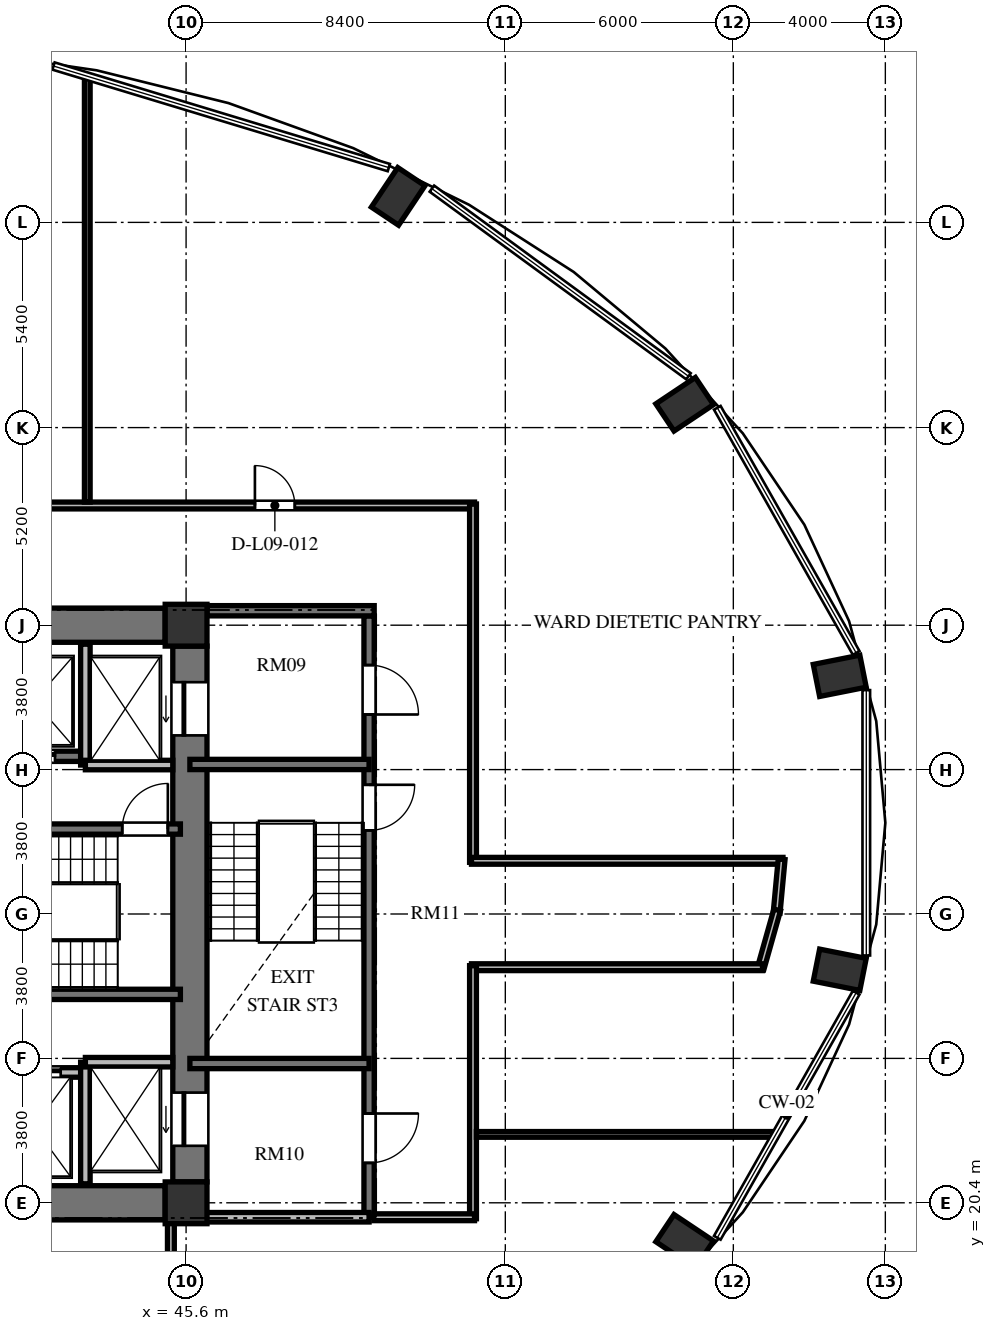
"""IFC4 building model, lengths in metres.
Left out: names, types, materials, properties, quantities, classifications, styles, units other than length and angle.
Written with IfcOpenShell. Run it as: python <this file> out.ifc"""

import sys

from ifc_helpers import new_model, si_unit, direction, frame, frame_2d, origin, origin_2d, place, context, subcontext, project, spatial, rectangle, extrude, element, fill, save


model = new_model("IFC4")
c1 = context("Model", 3, precision=1e-05, world=origin(), true_north=direction((0.0, 1.0)))
c2 = subcontext(c1, "Body", "Model", "MODEL_VIEW")
j1 = project(units=[si_unit("LENGTHUNIT", "METRE"), si_unit("PLANEANGLEUNIT", "RADIAN")], contexts=[c1])
p1 = place(None, origin())
s1 = spatial("IfcSite", under=j1, at=p1, CompositionType="ELEMENT")
p2 = place(p1, origin())
s2 = spatial("IfcBuilding", under=s1, at=p2, CompositionType="ELEMENT")
p3 = place(p2, frame((0.0, 0.0, 39.792)))
s3 = spatial("IfcBuildingStorey", under=s2, at=p3, CompositionType="ELEMENT", Elevation=39.792)
for number, where, z_axis, x_axis in (
    (1, (58.72, 19.386, 0.0), (0.0, 0.0, 1.0), (0.831, -0.556, 0.0)),
    (2, (62.8, 26.532, 0.0), (0.0, 0.0, 1.0), (0.981, -0.195, 0.0)),
    (3, (62.8, 34.268, 0.0), (0.0, 0.0, 1.0), (0.981, 0.195, 0.0)),
    (4, (58.72, 41.414, 0.0), (0.0, 0.0, 1.0), (0.831, 0.556, 0.0)),
    (5, (51.181, 46.884, 0.0), (0.0, 0.0, 1.0), (0.556, 0.831, 0.0)),
):
    element("IfcColumn", number, at=place(p3, frame(where, z_axis=z_axis, x_axis=x_axis)), inside=s3, PredefinedType="COLUMN", context=c2, shape_type="SweptSolid", body=[
        extrude(rectangle(XDim=1.25, YDim=0.86, at=origin_2d()), origin(), (0.0, 0.0, 1.0), 3.648),
    ])
for number, where, z_axis, x_axis in (
    (6, (45.6, 20.4, 0.0), (0.0, 0.0, 1.0), (1.0, 0.0, 0.0)),
    (7, (45.6, 35.6, 0.0), (0.0, 0.0, 1.0), (1.0, 0.0, 0.0)),
):
    element("IfcColumn", number, at=place(p3, frame(where, z_axis=z_axis, x_axis=x_axis)), inside=s3, PredefinedType="COLUMN", context=c2, shape_type="SweptSolid", body=[
        extrude(rectangle(XDim=1.1, YDim=1.1, at=origin_2d()), origin(), (0.0, 0.0, 1.0), 3.648),
    ])
p4 = place(p3, frame((45.7, 20.95, 0.0), z_axis=(0.0, 0.0, 1.0), x_axis=(0.0, 1.0, 0.0)))
e8 = element("IfcWall", 8, at=p4, inside=s3, PredefinedType="SHEAR", context=c2, shape_type="SweptSolid", body=[
    extrude(rectangle(XDim=14.1, YDim=0.9, at=frame_2d((7.05, 0.0))), origin(), (0.0, 0.0, 1.0), 3.648),
])
p5 = place(p4, frame((11.75, 0.0, 0.0)))
e9 = element("IfcOpeningElement", 9, at=p5, cuts=e8, PredefinedType="OPENING", context=c2, shape_type="SweptSolid", body=[
    extrude(rectangle(XDim=1.4, YDim=2.3, at=frame_2d((0.7, 1.15))), frame((0.0, 0.46, 0.0), z_axis=(0.0, -1.0, 0.0), x_axis=(1.0, 0.0, 0.0)), (0.0, 0.0, 1.0), 0.92),
])
p6 = place(p4, frame((0.95, 0.0, 0.0)))
e10 = element("IfcOpeningElement", 10, at=p6, cuts=e8, PredefinedType="OPENING", context=c2, shape_type="SweptSolid", body=[
    extrude(rectangle(XDim=1.4, YDim=2.3, at=frame_2d((0.7, 1.15))), frame((0.0, 0.46, 0.0), z_axis=(0.0, -1.0, 0.0), x_axis=(1.0, 0.0, 0.0)), (0.0, 0.0, 1.0), 0.92),
])
for number, where, z_axis, x_axis in (
    (11, (39.75, 20.4, 0.0), (0.0, 0.0, 1.0), (1.0, 0.0, 0.0)),
    (12, (39.75, 35.6, 0.0), (0.0, 0.0, 1.0), (1.0, 0.0, 0.0)),
):
    element("IfcWall", number, at=place(p3, frame(where, z_axis=z_axis, x_axis=x_axis)), inside=s3, PredefinedType="SHEAR", context=c2, shape_type="SweptSolid", body=[
        extrude(rectangle(XDim=5.3, YDim=0.9, at=frame_2d((2.65, 0.0))), origin(), (0.0, 0.0, 1.0), 3.648),
    ])
p7 = place(p3, frame((37.465, 30.235, 0.0), z_axis=(0.0, 0.0, 1.0), x_axis=(1.0, 0.0, 0.0)))
e13 = element("IfcWall", 13, at=p7, inside=s3, PredefinedType="SHEAR", context=c2, shape_type="SweptSolid", body=[
    extrude(rectangle(XDim=7.985, YDim=0.27, at=frame_2d((3.992, 0.0))), origin(), (0.0, 0.0, 1.0), 3.648),
])
p8 = place(p7, frame((6.455, 0.0, 0.0)))
e14 = element("IfcOpeningElement", 14, at=p8, cuts=e13, PredefinedType="OPENING", context=c2, shape_type="SweptSolid", body=[
    extrude(rectangle(XDim=1.2, YDim=2.15, at=frame_2d((0.6, 1.075))), frame((0.0, 0.145, 0.0), z_axis=(0.0, -1.0, 0.0), x_axis=(1.0, 0.0, 0.0)), (0.0, 0.0, 1.0), 0.29),
])
p9 = place(p3, frame((37.465, 25.885, 0.0), z_axis=(0.0, 0.0, 1.0), x_axis=(1.0, 0.0, 0.0)))
e15 = element("IfcWall", 15, at=p9, inside=s3, PredefinedType="SHEAR", context=c2, shape_type="SweptSolid", body=[
    extrude(rectangle(XDim=7.985, YDim=0.27, at=frame_2d((3.992, 0.0))), origin(), (0.0, 0.0, 1.0), 3.648),
])
p10 = place(p3, frame((26.55, 32.15, 0.0), z_axis=(0.0, 0.0, 1.0), x_axis=(1.0, 0.0, 0.0)))
e16 = element("IfcWall", 16, at=p10, inside=s3, PredefinedType="SHEAR", context=c2, shape_type="SweptSolid", body=[
    extrude(rectangle(XDim=16.4, YDim=0.27, at=frame_2d((8.2, 0.0))), origin(), (0.0, 0.0, 1.0), 3.648),
])
p11 = place(p10, frame((1.1, 0.0, 0.0)))
e17 = element("IfcOpeningElement", 17, at=p11, cuts=e16, PredefinedType="OPENING", context=c2, shape_type="SweptSolid", body=[
    extrude(rectangle(XDim=1.1, YDim=2.2, at=frame_2d((0.55, 1.1))), frame((0.0, 0.145, 0.0), z_axis=(0.0, -1.0, 0.0), x_axis=(1.0, 0.0, 0.0)), (0.0, 0.0, 1.0), 0.29),
])
p12 = place(p10, frame((3.7, 0.0, 0.0)))
e18 = element("IfcOpeningElement", 18, at=p12, cuts=e16, PredefinedType="OPENING", context=c2, shape_type="SweptSolid", body=[
    extrude(rectangle(XDim=1.1, YDim=2.2, at=frame_2d((0.55, 1.1))), frame((0.0, 0.145, 0.0), z_axis=(0.0, -1.0, 0.0), x_axis=(1.0, 0.0, 0.0)), (0.0, 0.0, 1.0), 0.29),
])
p13 = place(p10, frame((6.5, 0.0, 0.0)))
e19 = element("IfcOpeningElement", 19, at=p13, cuts=e16, PredefinedType="OPENING", context=c2, shape_type="SweptSolid", body=[
    extrude(rectangle(XDim=1.1, YDim=2.2, at=frame_2d((0.55, 1.1))), frame((0.0, 0.145, 0.0), z_axis=(0.0, -1.0, 0.0), x_axis=(1.0, 0.0, 0.0)), (0.0, 0.0, 1.0), 0.29),
])
p14 = place(p10, frame((9.1, 0.0, 0.0)))
e20 = element("IfcOpeningElement", 20, at=p14, cuts=e16, PredefinedType="OPENING", context=c2, shape_type="SweptSolid", body=[
    extrude(rectangle(XDim=1.1, YDim=2.2, at=frame_2d((0.55, 1.1))), frame((0.0, 0.145, 0.0), z_axis=(0.0, -1.0, 0.0), x_axis=(1.0, 0.0, 0.0)), (0.0, 0.0, 1.0), 0.29),
])
p15 = place(p10, frame((11.9, 0.0, 0.0)))
e21 = element("IfcOpeningElement", 21, at=p15, cuts=e16, PredefinedType="OPENING", context=c2, shape_type="SweptSolid", body=[
    extrude(rectangle(XDim=1.1, YDim=2.2, at=frame_2d((0.55, 1.1))), frame((0.0, 0.145, 0.0), z_axis=(0.0, -1.0, 0.0), x_axis=(1.0, 0.0, 0.0)), (0.0, 0.0, 1.0), 0.29),
])
p16 = place(p10, frame((14.5, 0.0, 0.0)))
e22 = element("IfcOpeningElement", 22, at=p16, cuts=e16, PredefinedType="OPENING", context=c2, shape_type="SweptSolid", body=[
    extrude(rectangle(XDim=1.1, YDim=2.2, at=frame_2d((0.55, 1.1))), frame((0.0, 0.145, 0.0), z_axis=(0.0, -1.0, 0.0), x_axis=(1.0, 0.0, 0.0)), (0.0, 0.0, 1.0), 0.29),
])
p17 = place(p3, frame((26.75, 23.83, 0.0), z_axis=(0.0, 0.0, 1.0), x_axis=(1.0, 0.0, 0.0)))
e23 = element("IfcWall", 23, at=p17, inside=s3, PredefinedType="SOLIDWALL", context=c2, shape_type="SweptSolid", body=[
    extrude(rectangle(XDim=16.2, YDim=0.25, at=frame_2d((8.1, 0.0))), origin(), (0.0, 0.0, 1.0), 3.428),
])
p18 = place(p17, frame((0.9, 0.0, 0.0)))
e24 = element("IfcOpeningElement", 24, at=p18, cuts=e23, PredefinedType="OPENING", context=c2, shape_type="SweptSolid", body=[
    extrude(rectangle(XDim=1.1, YDim=2.2, at=frame_2d((0.55, 1.1))), frame((0.0, 0.135, 0.0), z_axis=(0.0, -1.0, 0.0), x_axis=(1.0, 0.0, 0.0)), (0.0, 0.0, 1.0), 0.27),
])
p19 = place(p17, frame((3.5, 0.0, 0.0)))
e25 = element("IfcOpeningElement", 25, at=p19, cuts=e23, PredefinedType="OPENING", context=c2, shape_type="SweptSolid", body=[
    extrude(rectangle(XDim=1.1, YDim=2.2, at=frame_2d((0.55, 1.1))), frame((0.0, 0.135, 0.0), z_axis=(0.0, -1.0, 0.0), x_axis=(1.0, 0.0, 0.0)), (0.0, 0.0, 1.0), 0.27),
])
p20 = place(p17, frame((6.3, 0.0, 0.0)))
e26 = element("IfcOpeningElement", 26, at=p20, cuts=e23, PredefinedType="OPENING", context=c2, shape_type="SweptSolid", body=[
    extrude(rectangle(XDim=1.1, YDim=2.2, at=frame_2d((0.55, 1.1))), frame((0.0, 0.135, 0.0), z_axis=(0.0, -1.0, 0.0), x_axis=(1.0, 0.0, 0.0)), (0.0, 0.0, 1.0), 0.27),
])
p21 = place(p17, frame((8.9, 0.0, 0.0)))
e27 = element("IfcOpeningElement", 27, at=p21, cuts=e23, PredefinedType="OPENING", context=c2, shape_type="SweptSolid", body=[
    extrude(rectangle(XDim=1.1, YDim=2.2, at=frame_2d((0.55, 1.1))), frame((0.0, 0.135, 0.0), z_axis=(0.0, -1.0, 0.0), x_axis=(1.0, 0.0, 0.0)), (0.0, 0.0, 1.0), 0.27),
])
p22 = place(p17, frame((11.7, 0.0, 0.0)))
e28 = element("IfcOpeningElement", 28, at=p22, cuts=e23, PredefinedType="OPENING", context=c2, shape_type="SweptSolid", body=[
    extrude(rectangle(XDim=1.1, YDim=2.2, at=frame_2d((0.55, 1.1))), frame((0.0, 0.135, 0.0), z_axis=(0.0, -1.0, 0.0), x_axis=(1.0, 0.0, 0.0)), (0.0, 0.0, 1.0), 0.27),
])
p23 = place(p17, frame((14.15, 0.0, 0.0)))
e29 = element("IfcOpeningElement", 29, at=p23, cuts=e23, PredefinedType="OPENING", context=c2, shape_type="SweptSolid", body=[
    extrude(rectangle(XDim=1.4, YDim=2.3, at=frame_2d((0.7, 1.15))), frame((0.0, 0.135, 0.0), z_axis=(0.0, -1.0, 0.0), x_axis=(1.0, 0.0, 0.0)), (0.0, 0.0, 1.0), 0.27),
])
p24 = place(p3, frame((42.95, 31.92, 0.0), z_axis=(0.0, 0.0, 1.0), x_axis=(0.0, 1.0, 0.0)))
e30 = element("IfcWall", 30, at=p24, inside=s3, PredefinedType="SOLIDWALL", context=c2, shape_type="SweptSolid", body=[
    extrude(rectangle(XDim=3.18, YDim=0.25, at=frame_2d((1.59, 0.0))), origin(), (0.0, 0.0, 1.0), 3.428),
])
p25 = place(p3, frame((42.95, 31.92, 0.0), z_axis=(0.0, 0.0, 1.0), x_axis=(1.0, 0.0, 0.0)))
e31 = element("IfcWall", 31, at=p25, inside=s3, PredefinedType="SOLIDWALL", context=c2, shape_type="SweptSolid", body=[
    extrude(rectangle(XDim=2.3, YDim=0.25, at=frame_2d((1.15, 0.0))), origin(), (0.0, 0.0, 1.0), 3.428),
])
p26 = place(p3, frame((42.95, 20.9, 0.0), z_axis=(0.0, 0.0, 1.0), x_axis=(0.0, 1.0, 0.0)))
e32 = element("IfcWall", 32, at=p26, inside=s3, PredefinedType="SOLIDWALL", context=c2, shape_type="SweptSolid", body=[
    extrude(rectangle(XDim=3.2, YDim=0.25, at=frame_2d((1.6, 0.0))), origin(), (0.0, 0.0, 1.0), 3.428),
])
p27 = place(p3, frame((42.95, 24.1, 0.0), z_axis=(0.0, 0.0, 1.0), x_axis=(1.0, 0.0, 0.0)))
e33 = element("IfcWall", 33, at=p27, inside=s3, PredefinedType="SOLIDWALL", context=c2, shape_type="SweptSolid", body=[
    extrude(rectangle(XDim=2.3, YDim=0.25, at=frame_2d((1.15, 0.0))), origin(), (0.0, 0.0, 1.0), 3.428),
])
p28 = place(p3, frame((50.415, 35.845, 0.0), z_axis=(0.0, 0.0, 1.0), x_axis=(0.0, -1.0, 0.0)))
e34 = element("IfcWall", 34, at=p28, inside=s3, PredefinedType="SHEAR", context=c2, shape_type="SweptSolid", body=[
    extrude(rectangle(XDim=15.825, YDim=0.27, at=frame_2d((7.913, 0.0))), origin(), (0.0, 0.0, 1.0), 3.648),
])
p29 = place(p28, frame((4.445, 0.0, 0.0)))
e35 = element("IfcOpeningElement", 35, at=p29, cuts=e34, PredefinedType="OPENING", context=c2, shape_type="SweptSolid", body=[
    extrude(rectangle(XDim=1.2, YDim=2.15, at=frame_2d((0.6, 1.075))), frame((0.0, 0.145, 0.0), z_axis=(0.0, -1.0, 0.0), x_axis=(1.0, 0.0, 0.0)), (0.0, 0.0, 1.0), 0.29),
])
p30 = place(p28, frame((1.295, 0.0, 0.0)))
e36 = element("IfcOpeningElement", 36, at=p30, cuts=e34, PredefinedType="OPENING", context=c2, shape_type="SweptSolid", body=[
    extrude(rectangle(XDim=1.3, YDim=2.2, at=frame_2d((0.65, 1.1))), frame((0.0, 0.145, 0.0), z_axis=(0.0, -1.0, 0.0), x_axis=(1.0, 0.0, 0.0)), (0.0, 0.0, 1.0), 0.29),
])
p31 = place(p28, frame((13.095, 0.0, 0.0)))
e37 = element("IfcOpeningElement", 37, at=p31, cuts=e34, PredefinedType="OPENING", context=c2, shape_type="SweptSolid", body=[
    extrude(rectangle(XDim=1.3, YDim=2.2, at=frame_2d((0.65, 1.1))), frame((0.0, 0.145, 0.0), z_axis=(0.0, -1.0, 0.0), x_axis=(1.0, 0.0, 0.0)), (0.0, 0.0, 1.0), 0.29),
])
p32 = place(p3, frame((46.15, 35.98, 0.0), z_axis=(0.0, 0.0, 1.0), x_axis=(1.0, 0.0, 0.0)))
e38 = element("IfcWall", 38, at=p32, inside=s3, PredefinedType="SHEAR", context=c2, shape_type="SweptSolid", body=[
    extrude(rectangle(XDim=4.4, YDim=0.27, at=frame_2d((2.2, 0.0))), origin(), (0.0, 0.0, 1.0), 3.648),
])
for number, where, z_axis, x_axis in (
    (39, (45.7, 31.935, 0.0), (0.0, 0.0, 1.0), (1.0, 0.0, 0.0)),
    (40, (45.7, 24.065, 0.0), (0.0, 0.0, 1.0), (1.0, 0.0, 0.0)),
):
    element("IfcWall", number, at=place(p3, frame(where, z_axis=z_axis, x_axis=x_axis)), inside=s3, PredefinedType="SHEAR", context=c2, shape_type="SweptSolid", body=[
        extrude(rectangle(XDim=4.715, YDim=0.27, at=frame_2d((2.357, 0.0))), origin(), (0.0, 0.0, 1.0), 3.648),
    ])
p33 = place(p3, frame((45.7, 20.02, 0.0), z_axis=(0.0, 0.0, 1.0), x_axis=(1.0, 0.0, 0.0)))
e41 = element("IfcWall", 41, at=p33, inside=s3, PredefinedType="SOLIDWALL", context=c2, shape_type="SweptSolid", body=[
    extrude(rectangle(XDim=4.715, YDim=0.25, at=frame_2d((2.357, 0.0))), origin(), (0.0, 0.0, 1.0), 2.813),
])
p34 = place(p3, frame((23.31, 38.75, 0.0), z_axis=(0.0, 0.0, 1.0), x_axis=(1.0, 0.0, 0.0)))
e42 = element("IfcWall", 42, at=p34, inside=s3, PredefinedType="PARTITIONING", context=c2, shape_type="SweptSolid", body=[
    extrude(rectangle(XDim=29.88, YDim=0.18, at=frame_2d((14.94, 0.0))), origin(), (0.0, 0.0, 1.0), 3.053),
])
p35 = place(p34, frame((24.101, 0.0, 0.0)))
e43 = element("IfcOpeningElement", 43, at=p35, cuts=e42, PredefinedType="OPENING", context=c2, shape_type="SweptSolid", body=[
    extrude(rectangle(XDim=1.05, YDim=2.15, at=frame_2d((0.525, 1.075))), frame((0.0, 0.1, 0.0), z_axis=(0.0, -1.0, 0.0), x_axis=(1.0, 0.0, 0.0)), (0.0, 0.0, 1.0), 0.2),
])
p36 = place(p34, frame((13.165, 0.0, 0.0)))
e44 = element("IfcOpeningElement", 44, at=p36, cuts=e42, PredefinedType="OPENING", context=c2, shape_type="SweptSolid", body=[
    extrude(rectangle(XDim=1.05, YDim=2.15, at=frame_2d((0.525, 1.075))), frame((0.0, 0.1, 0.0), z_axis=(0.0, -1.0, 0.0), x_axis=(1.0, 0.0, 0.0)), (0.0, 0.0, 1.0), 0.2),
])
p37 = place(p34, frame((4.479, 0.0, 0.0)))
e45 = element("IfcOpeningElement", 45, at=p37, cuts=e42, PredefinedType="OPENING", context=c2, shape_type="SweptSolid", body=[
    extrude(rectangle(XDim=1.05, YDim=2.15, at=frame_2d((0.525, 1.075))), frame((0.0, 0.1, 0.0), z_axis=(0.0, -1.0, 0.0), x_axis=(1.0, 0.0, 0.0)), (0.0, 0.0, 1.0), 0.2),
])
p38 = place(p3, frame((53.15, 38.79, 0.0), z_axis=(0.0, 0.0, 1.0), x_axis=(0.0, -1.0, 0.0)))
e46 = element("IfcWall", 46, at=p38, inside=s3, PredefinedType="PARTITIONING", context=c2, shape_type="SweptSolid", body=[
    extrude(rectangle(XDim=9.43, YDim=0.18, at=frame_2d((4.715, 0.0))), origin(), (0.0, 0.0, 1.0), 3.428),
])
p39 = place(p3, frame((53.11, 29.4, 0.0), z_axis=(0.0, 0.0, 1.0), x_axis=(1.0, 0.0, 0.0)))
e47 = element("IfcWall", 47, at=p39, inside=s3, PredefinedType="PARTITIONING", context=c2, shape_type="SweptSolid", body=[
    extrude(rectangle(XDim=8.197, YDim=0.18, at=frame_2d((4.098, 0.0))), origin(), (0.0, 0.0, 1.0), 3.428),
])
p40 = place(p3, frame((61.271, 29.44, 0.0), z_axis=(0.0, 0.0, 1.0), x_axis=(-0.092539930621, -0.995708974169, 0.0)))
e48 = element("IfcWall", 48, at=p40, inside=s3, PredefinedType="PARTITIONING", context=c2, shape_type="SweptSolid", body=[
    extrude(rectangle(XDim=1.417, YDim=0.18, at=frame_2d((0.708, 0.0))), origin(), (0.0, 0.0, 1.0), 3.428),
])
p41 = place(p3, frame((61.154, 28.107, 0.0), z_axis=(0.0, 0.0, 1.0), x_axis=(-0.271748942561, -0.962368179138, 0.0)))
e49 = element("IfcWall", 49, at=p41, inside=s3, PredefinedType="PARTITIONING", context=c2, shape_type="SweptSolid", body=[
    extrude(rectangle(XDim=1.606, YDim=0.18, at=frame_2d((0.803, 0.0))), origin(), (0.0, 0.0, 1.0), 3.428),
])
p42 = place(p3, frame((60.768, 26.6, 0.0), z_axis=(0.0, 0.0, 1.0), x_axis=(-1.0, 0.0, 0.0)))
e50 = element("IfcWall", 50, at=p42, inside=s3, PredefinedType="PARTITIONING", context=c2, shape_type="SweptSolid", body=[
    extrude(rectangle(XDim=7.658, YDim=0.18, at=frame_2d((3.829, 0.0))), origin(), (0.0, 0.0, 1.0), 3.428),
])
p43 = place(p3, frame((53.15, 26.64, 0.0), z_axis=(0.0, 0.0, 1.0), x_axis=(0.0, -1.0, 0.0)))
e51 = element("IfcWall", 51, at=p43, inside=s3, PredefinedType="PARTITIONING", context=c2, shape_type="SweptSolid", body=[
    extrude(rectangle(XDim=6.66, YDim=0.18, at=frame_2d((3.33, 0.0))), origin(), (0.0, 0.0, 1.0), 3.428),
])
p44 = place(p3, frame((53.19, 20.02, 0.0), z_axis=(0.0, 0.0, 1.0), x_axis=(-1.0, 0.0, 0.0)))
e52 = element("IfcWall", 52, at=p44, inside=s3, PredefinedType="PARTITIONING", context=c2, shape_type="SweptSolid", body=[
    extrude(rectangle(XDim=2.65, YDim=0.18, at=frame_2d((1.325, 0.0))), origin(), (0.0, 0.0, 1.0), 2.813),
])
p45 = place(p3, frame((45.2, 19.91, 0.0), z_axis=(0.0, 0.0, 1.0), x_axis=(0.0, -1.0, 0.0)))
e53 = element("IfcWall", 53, at=p45, inside=s3, PredefinedType="PARTITIONING", context=c2, shape_type="SweptSolid", body=[
    extrude(rectangle(XDim=2.55, YDim=0.18, at=frame_2d((1.275, 0.0))), origin(), (0.0, 0.0, 1.0), 3.428),
])
p46 = place(p3, frame((53.24, 22.2, 0.0), z_axis=(0.0, 0.0, 1.0), x_axis=(1.0, 0.0, 0.0)))
e54 = element("IfcWall", 54, at=p46, inside=s3, PredefinedType="PARTITIONING", context=c2, shape_type="SweptSolid", body=[
    extrude(rectangle(XDim=7.875, YDim=0.15, at=frame_2d((3.938, 0.0))), origin(), (0.0, 0.0, 1.0), 3.428),
])
p47 = place(p3, frame((43.0, 38.84, 0.0), z_axis=(0.0, 0.0, 1.0), x_axis=(0.0, 1.0, 0.0)))
e55 = element("IfcWall", 55, at=p47, inside=s3, PredefinedType="PARTITIONING", context=c2, shape_type="SweptSolid", body=[
    extrude(rectangle(XDim=11.193, YDim=0.15, at=frame_2d((5.597, 0.0))), origin(), (0.0, 0.0, 1.0), 3.428),
])
p48 = place(p8, origin())
e56 = element("IfcDoor", 56, at=p48, inside=s3, OperationType="SINGLE_SWING_RIGHT", PredefinedType="DOOR", context=c2, shape_type="SweptSolid", body=[
    extrude(rectangle(XDim=1.2, YDim=2.15, at=frame_2d((0.6, 1.075))), frame((0.0, 0.025, 0.0), z_axis=(0.0, -1.0, 0.0), x_axis=(1.0, 0.0, 0.0)), (0.0, 0.0, 1.0), 0.05),
])
fill(e14, e56)
p49 = place(p16, origin())
e57 = element("IfcDoor", 57, at=p49, inside=s3, OperationType="SLIDING_TO_LEFT", PredefinedType="DOOR", context=c2, shape_type="SweptSolid", body=[
    extrude(rectangle(XDim=1.1, YDim=2.2, at=frame_2d((0.55, 1.1))), frame((0.0, 0.025, 0.0), z_axis=(0.0, -1.0, 0.0), x_axis=(1.0, 0.0, 0.0)), (0.0, 0.0, 1.0), 0.05),
])
fill(e22, e57)
p50 = place(p5, origin())
e58 = element("IfcDoor", 58, at=p50, inside=s3, OperationType="SLIDING_TO_LEFT", PredefinedType="DOOR", context=c2, shape_type="SweptSolid", body=[
    extrude(rectangle(XDim=1.4, YDim=2.3, at=frame_2d((0.7, 1.15))), frame((0.0, 0.025, 0.0), z_axis=(0.0, -1.0, 0.0), x_axis=(1.0, 0.0, 0.0)), (0.0, 0.0, 1.0), 0.05),
])
fill(e9, e58)
p51 = place(p6, origin())
e59 = element("IfcDoor", 59, at=p51, inside=s3, OperationType="SLIDING_TO_LEFT", PredefinedType="DOOR", context=c2, shape_type="SweptSolid", body=[
    extrude(rectangle(XDim=1.4, YDim=2.3, at=frame_2d((0.7, 1.15))), frame((0.0, 0.025, 0.0), z_axis=(0.0, -1.0, 0.0), x_axis=(1.0, 0.0, 0.0)), (0.0, 0.0, 1.0), 0.05),
])
fill(e10, e59)
p52 = place(p23, origin())
e60 = element("IfcDoor", 60, at=p52, inside=s3, OperationType="SLIDING_TO_LEFT", PredefinedType="DOOR", context=c2, shape_type="SweptSolid", body=[
    extrude(rectangle(XDim=1.4, YDim=2.3, at=frame_2d((0.7, 1.15))), frame((0.0, 0.025, 0.0), z_axis=(0.0, -1.0, 0.0), x_axis=(1.0, 0.0, 0.0)), (0.0, 0.0, 1.0), 0.05),
])
fill(e29, e60)
p53 = place(p29, origin())
e61 = element("IfcDoor", 61, at=p53, inside=s3, OperationType="SINGLE_SWING_LEFT", PredefinedType="DOOR", context=c2, shape_type="SweptSolid", body=[
    extrude(rectangle(XDim=1.2, YDim=2.15, at=frame_2d((0.6, 1.075))), frame((0.0, 0.025, 0.0), z_axis=(0.0, -1.0, 0.0), x_axis=(1.0, 0.0, 0.0)), (0.0, 0.0, 1.0), 0.05),
])
fill(e35, e61)
p54 = place(p30, origin())
e62 = element("IfcDoor", 62, at=p54, inside=s3, OperationType="SINGLE_SWING_RIGHT", PredefinedType="DOOR", context=c2, shape_type="SweptSolid", body=[
    extrude(rectangle(XDim=1.3, YDim=2.2, at=frame_2d((0.65, 1.1))), frame((0.0, 0.025, 0.0), z_axis=(0.0, -1.0, 0.0), x_axis=(1.0, 0.0, 0.0)), (0.0, 0.0, 1.0), 0.05),
])
fill(e36, e62)
p55 = place(p31, origin())
e63 = element("IfcDoor", 63, at=p55, inside=s3, OperationType="SINGLE_SWING_LEFT", PredefinedType="DOOR", context=c2, shape_type="SweptSolid", body=[
    extrude(rectangle(XDim=1.3, YDim=2.2, at=frame_2d((0.65, 1.1))), frame((0.0, 0.025, 0.0), z_axis=(0.0, -1.0, 0.0), x_axis=(1.0, 0.0, 0.0)), (0.0, 0.0, 1.0), 0.05),
])
fill(e37, e63)
p56 = place(p35, origin())
e64 = element("IfcDoor", 64, at=p56, inside=s3, OperationType="SINGLE_SWING_LEFT", PredefinedType="DOOR", context=c2, shape_type="SweptSolid", body=[
    extrude(rectangle(XDim=1.05, YDim=2.15, at=frame_2d((0.525, 1.075))), frame((0.0, 0.025, 0.0), z_axis=(0.0, -1.0, 0.0), x_axis=(1.0, 0.0, 0.0)), (0.0, 0.0, 1.0), 0.05),
])
fill(e43, e64)
save(model, sys.argv[1])
